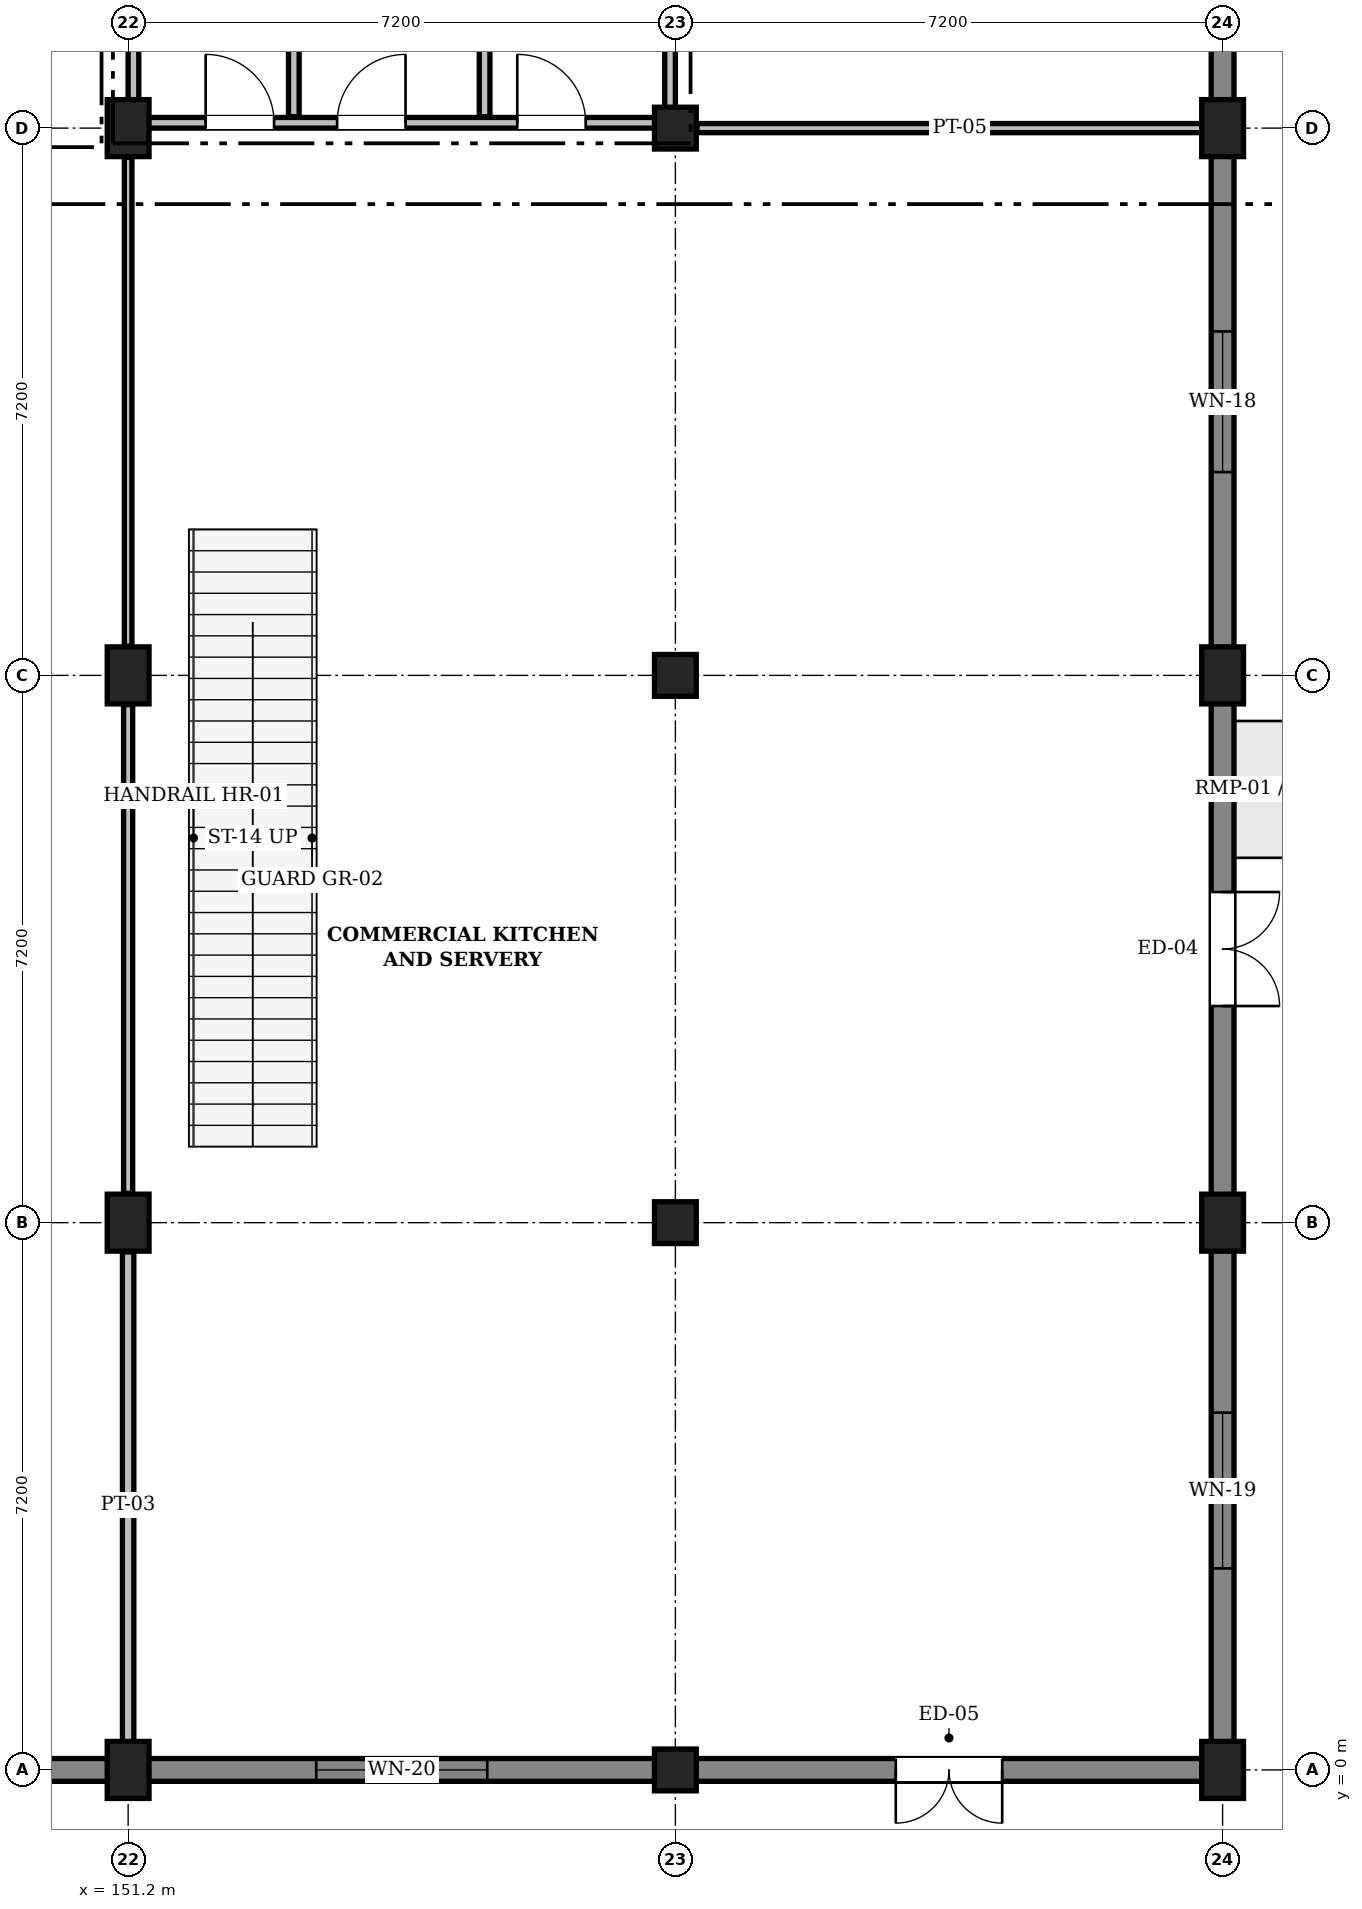
"""IFC4 building model, lengths in metres.
Left out: names, types, materials, properties, quantities, classifications, styles, units other than length and angle.
Written with IfcOpenShell. Run it as: python <this file> out.ifc"""

import sys

from ifc_helpers import new_model, si_unit, direction, frame, frame_2d, origin, origin_2d, place, context, subcontext, project, spatial, rectangle, extrude, element, fill, save


model = new_model("IFC4")
c1 = context("Model", 3, precision=1e-05, world=origin(), true_north=direction((0.0, 1.0)))
c2 = subcontext(c1, "Body", "Model", "MODEL_VIEW")
j1 = project(units=[si_unit("LENGTHUNIT", "METRE"), si_unit("PLANEANGLEUNIT", "RADIAN")], contexts=[c1])
p1 = place(None, origin())
s1 = spatial("IfcSite", under=j1, at=p1, CompositionType="ELEMENT")
p2 = place(p1, origin())
s2 = spatial("IfcBuilding", under=s1, at=p2, CompositionType="ELEMENT")
p3 = place(p2, origin())
s3 = spatial("IfcBuildingStorey", under=s2, at=p3, CompositionType="ELEMENT", Elevation=0.0)
for number, where, z_axis, x_axis in (
    (1, (151.2, 0.0, 0.0), (0.0, 0.0, 1.0), (1.0, 0.0, 0.0)),
    (2, (151.2, 7.2, 0.0), (0.0, 0.0, 1.0), (1.0, 0.0, 0.0)),
    (3, (151.2, 14.4, 0.0), (0.0, 0.0, 1.0), (1.0, 0.0, 0.0)),
    (4, (151.2, 21.6, 0.0), (0.0, 0.0, 1.0), (1.0, 0.0, 0.0)),
):
    element("IfcColumn", number, at=place(p3, frame(where, z_axis=z_axis, x_axis=x_axis)), inside=s3, PredefinedType="COLUMN", context=c2, shape_type="SweptSolid", body=[
        extrude(rectangle(XDim=0.55, YDim=0.75, at=origin_2d()), origin(), (0.0, 0.0, 1.0), 4.8),
    ])
for number, where, z_axis, x_axis in (
    (5, (158.4, 0.0, 0.0), (0.0, 0.0, 1.0), (1.0, 0.0, 0.0)),
    (6, (158.4, 7.2, 0.0), (0.0, 0.0, 1.0), (1.0, 0.0, 0.0)),
    (7, (158.4, 14.4, 0.0), (0.0, 0.0, 1.0), (1.0, 0.0, 0.0)),
    (8, (158.4, 21.6, 0.0), (0.0, 0.0, 1.0), (1.0, 0.0, 0.0)),
):
    element("IfcColumn", number, at=place(p3, frame(where, z_axis=z_axis, x_axis=x_axis)), inside=s3, PredefinedType="COLUMN", context=c2, shape_type="SweptSolid", body=[
        extrude(rectangle(XDim=0.55, YDim=0.55, at=origin_2d()), origin(), (0.0, 0.0, 1.0), 4.8),
    ])
for number, where, z_axis, x_axis in (
    (9, (165.6, 0.0, 0.0), (0.0, 0.0, 1.0), (1.0, 0.0, 0.0)),
    (10, (165.6, 7.2, 0.0), (0.0, 0.0, 1.0), (1.0, 0.0, 0.0)),
    (11, (165.6, 14.4, 0.0), (0.0, 0.0, 1.0), (1.0, 0.0, 0.0)),
    (12, (165.6, 21.6, 0.0), (0.0, 0.0, 1.0), (1.0, 0.0, 0.0)),
):
    element("IfcColumn", number, at=place(p3, frame(where, z_axis=z_axis, x_axis=x_axis)), inside=s3, PredefinedType="COLUMN", context=c2, shape_type="SweptSolid", body=[
        extrude(rectangle(XDim=0.55, YDim=0.75, at=origin_2d()), origin(), (0.0, 0.0, 1.0), 4.8),
    ])
p4 = place(p3, frame((165.6, 28.8, 0.0), z_axis=(0.0, 0.0, 1.0), x_axis=(0.0, -1.0, 0.0)))
e13 = element("IfcWall", 13, at=p4, inside=s3, PredefinedType="SOLIDWALL", context=c2, shape_type="SweptSolid", body=[
    extrude(rectangle(XDim=7.2, YDim=0.3, at=frame_2d((3.6, 0.0))), origin(), (0.0, 0.0, 1.0), 4.52),
])
p5 = place(p4, frame((2.8, 0.0, 0.0)))
e14 = element("IfcOpeningElement", 14, at=p5, cuts=e13, PredefinedType="OPENING", context=c2, shape_type="SweptSolid", body=[
    extrude(rectangle(XDim=1.6, YDim=2.2, at=frame_2d((0.8, 1.1))), frame((0.0, 0.162, 0.0), z_axis=(0.0, -1.0, 0.0), x_axis=(1.0, 0.0, 0.0)), (0.0, 0.0, 1.0), 0.324),
])
p6 = place(p3, frame((165.6, 21.6, 0.0), z_axis=(0.0, 0.0, 1.0), x_axis=(0.0, -1.0, 0.0)))
e15 = element("IfcWall", 15, at=p6, inside=s3, PredefinedType="SOLIDWALL", context=c2, shape_type="SweptSolid", body=[
    extrude(rectangle(XDim=7.2, YDim=0.3, at=frame_2d((3.6, 0.0))), origin(), (0.0, 0.0, 1.0), 4.52),
])
p7 = place(p6, frame((2.675, 0.0, 0.95)))
e16 = element("IfcOpeningElement", 16, at=p7, cuts=e15, PredefinedType="OPENING", context=c2, shape_type="SweptSolid", body=[
    extrude(rectangle(XDim=1.85, YDim=1.55, at=frame_2d((0.925, 0.775))), frame((0.0, 0.162, 0.0), z_axis=(0.0, -1.0, 0.0), x_axis=(1.0, 0.0, 0.0)), (0.0, 0.0, 1.0), 0.324),
])
p8 = place(p3, frame((165.6, 14.4, 0.0), z_axis=(0.0, 0.0, 1.0), x_axis=(0.0, -1.0, 0.0)))
e17 = element("IfcWall", 17, at=p8, inside=s3, PredefinedType="SOLIDWALL", context=c2, shape_type="SweptSolid", body=[
    extrude(rectangle(XDim=7.2, YDim=0.3, at=frame_2d((3.6, 0.0))), origin(), (0.0, 0.0, 1.0), 4.52),
])
p9 = place(p8, frame((2.85, 0.0, 0.0)))
e18 = element("IfcOpeningElement", 18, at=p9, cuts=e17, PredefinedType="OPENING", context=c2, shape_type="SweptSolid", body=[
    extrude(rectangle(XDim=1.5, YDim=2.15, at=frame_2d((0.75, 1.075))), frame((0.0, 0.162, 0.0), z_axis=(0.0, -1.0, 0.0), x_axis=(1.0, 0.0, 0.0)), (0.0, 0.0, 1.0), 0.324),
])
p10 = place(p3, frame((165.6, 7.2, 0.0), z_axis=(0.0, 0.0, 1.0), x_axis=(0.0, -1.0, 0.0)))
e19 = element("IfcWall", 19, at=p10, inside=s3, PredefinedType="SOLIDWALL", context=c2, shape_type="SweptSolid", body=[
    extrude(rectangle(XDim=7.048, YDim=0.3, at=frame_2d((3.524, 0.0))), origin(), (0.0, 0.0, 1.0), 4.52),
])
p11 = place(p10, frame((2.499, 0.0, 0.95)))
e20 = element("IfcOpeningElement", 20, at=p11, cuts=e19, PredefinedType="OPENING", context=c2, shape_type="SweptSolid", body=[
    extrude(rectangle(XDim=2.05, YDim=1.55, at=frame_2d((1.025, 0.775))), frame((0.0, 0.162, 0.0), z_axis=(0.0, -1.0, 0.0), x_axis=(1.0, 0.0, 0.0)), (0.0, 0.0, 1.0), 0.324),
])
p12 = place(p3, frame((165.75, 0.0, 0.0), z_axis=(0.0, 0.0, 1.0), x_axis=(-1.0, 0.0, 0.0)))
e21 = element("IfcWall", 21, at=p12, inside=s3, PredefinedType="SOLIDWALL", context=c2, shape_type="SweptSolid", body=[
    extrude(rectangle(XDim=7.35, YDim=0.3, at=frame_2d((3.675, 0.0))), origin(), (0.0, 0.0, 1.0), 4.52),
])
p13 = place(p12, frame((3.05, 0.0, 0.0)))
e22 = element("IfcOpeningElement", 22, at=p13, cuts=e21, PredefinedType="OPENING", context=c2, shape_type="SweptSolid", body=[
    extrude(rectangle(XDim=1.4, YDim=2.15, at=frame_2d((0.7, 1.075))), frame((0.0, 0.162, 0.0), z_axis=(0.0, -1.0, 0.0), x_axis=(1.0, 0.0, 0.0)), (0.0, 0.0, 1.0), 0.324),
])
p14 = place(p3, frame((158.4, 0.0, 0.0), z_axis=(0.0, 0.0, 1.0), x_axis=(-1.0, 0.0, 0.0)))
e23 = element("IfcWall", 23, at=p14, inside=s3, PredefinedType="SOLIDWALL", context=c2, shape_type="SweptSolid", body=[
    extrude(rectangle(XDim=7.2, YDim=0.3, at=frame_2d((3.6, 0.0))), origin(), (0.0, 0.0, 1.0), 4.52),
])
p15 = place(p14, frame((2.475, 0.0, 0.95)))
e24 = element("IfcOpeningElement", 24, at=p15, cuts=e23, PredefinedType="OPENING", context=c2, shape_type="SweptSolid", body=[
    extrude(rectangle(XDim=2.25, YDim=1.55, at=frame_2d((1.125, 0.775))), frame((0.0, 0.162, 0.0), z_axis=(0.0, -1.0, 0.0), x_axis=(1.0, 0.0, 0.0)), (0.0, 0.0, 1.0), 0.324),
])
p16 = place(p3, frame((151.2, 0.0, 0.0), z_axis=(0.0, 0.0, 1.0), x_axis=(-1.0, 0.0, 0.0)))
e25 = element("IfcWall", 25, at=p16, inside=s3, PredefinedType="SOLIDWALL", context=c2, shape_type="SweptSolid", body=[
    extrude(rectangle(XDim=7.2, YDim=0.3, at=frame_2d((3.6, 0.0))), origin(), (0.0, 0.0, 1.0), 4.52),
])
p17 = place(p16, frame((3.04, 0.0, 0.0)))
e26 = element("IfcOpeningElement", 26, at=p17, cuts=e25, PredefinedType="OPENING", context=c2, shape_type="SweptSolid", body=[
    extrude(rectangle(XDim=1.12, YDim=2.15, at=frame_2d((0.56, 1.075))), frame((0.0, 0.162, 0.0), z_axis=(0.0, -1.0, 0.0), x_axis=(1.0, 0.0, 0.0)), (0.0, 0.0, 1.0), 0.324),
])
p18 = place(p3, frame((151.27, 21.67, 0.0), z_axis=(0.0, 0.0, 1.0), x_axis=(1.0, 0.0, 0.0)))
e27 = element("IfcWall", 27, at=p18, inside=s3, PredefinedType="PARTITIONING", context=c2, shape_type="SweptSolid", body=[
    extrude(rectangle(XDim=7.06, YDim=0.14, at=frame_2d((3.53, 0.0))), origin(), (0.0, 0.0, 1.0), 3.83),
])
p19 = place(p18, frame((0.95, 0.0, 0.0)))
e28 = element("IfcOpeningElement", 28, at=p19, cuts=e27, PredefinedType="OPENING", context=c2, shape_type="SweptSolid", body=[
    extrude(rectangle(XDim=0.9, YDim=2.08, at=frame_2d((0.45, 1.04))), frame((0.0, 0.082, 0.0), z_axis=(0.0, -1.0, 0.0), x_axis=(1.0, 0.0, 0.0)), (0.0, 0.0, 1.0), 0.164),
])
p20 = place(p18, frame((2.68, 0.0, 0.0)))
e29 = element("IfcOpeningElement", 29, at=p20, cuts=e27, PredefinedType="OPENING", context=c2, shape_type="SweptSolid", body=[
    extrude(rectangle(XDim=0.9, YDim=2.08, at=frame_2d((0.45, 1.04))), frame((0.0, 0.082, 0.0), z_axis=(0.0, -1.0, 0.0), x_axis=(1.0, 0.0, 0.0)), (0.0, 0.0, 1.0), 0.164),
])
p21 = place(p18, frame((5.05, 0.0, 0.0)))
e30 = element("IfcOpeningElement", 30, at=p21, cuts=e27, PredefinedType="OPENING", context=c2, shape_type="SweptSolid", body=[
    extrude(rectangle(XDim=0.9, YDim=2.08, at=frame_2d((0.45, 1.04))), frame((0.0, 0.082, 0.0), z_axis=(0.0, -1.0, 0.0), x_axis=(1.0, 0.0, 0.0)), (0.0, 0.0, 1.0), 0.164),
])
for number, where, z_axis, x_axis in (
    (31, (151.27, 21.75, 0.0), (0.0, 0.0, 1.0), (0.0, 1.0, 0.0)),
    (32, (158.33, 21.75, 0.0), (0.0, 0.0, 1.0), (0.0, 1.0, 0.0)),
):
    element("IfcWall", number, at=place(p3, frame(where, z_axis=z_axis, x_axis=x_axis)), inside=s3, PredefinedType="PARTITIONING", context=c2, shape_type="SweptSolid", body=[
        extrude(rectangle(XDim=6.9, YDim=0.14, at=frame_2d((3.45, 0.0))), origin(), (0.0, 0.0, 1.0), 4.08),
    ])
for number, where, z_axis, x_axis in (
    (33, (153.38, 21.75, 0.0), (0.0, 0.0, 1.0), (0.0, 1.0, 0.0)),
    (34, (155.89, 21.75, 0.0), (0.0, 0.0, 1.0), (0.0, 1.0, 0.0)),
):
    element("IfcWall", number, at=place(p3, frame(where, z_axis=z_axis, x_axis=x_axis)), inside=s3, PredefinedType="PARTITIONING", context=c2, shape_type="SweptSolid", body=[
        extrude(rectangle(XDim=6.9, YDim=0.14, at=frame_2d((3.45, 0.0))), origin(), (0.0, 0.0, 1.0), 4.46),
    ])
p22 = place(p3, frame((151.2, 0.162, 0.0), z_axis=(0.0, 0.0, 1.0), x_axis=(0.0, 1.0, 0.0)))
e35 = element("IfcWall", 35, at=p22, inside=s3, PredefinedType="PARTITIONING", context=c2, shape_type="SweptSolid", body=[
    extrude(rectangle(XDim=6.653, YDim=0.15, at=frame_2d((3.326, 0.0))), origin(), (0.0, 0.0, 1.0), 4.08),
])
p23 = place(p3, frame((151.2, 7.585, 0.0), z_axis=(0.0, 0.0, 1.0), x_axis=(0.0, 1.0, 0.0)))
e36 = element("IfcWall", 36, at=p23, inside=s3, PredefinedType="PARTITIONING", context=c2, shape_type="SweptSolid", body=[
    extrude(rectangle(XDim=6.43, YDim=0.12, at=frame_2d((3.215, 0.0))), origin(), (0.0, 0.0, 1.0), 4.08),
])
p24 = place(p3, frame((151.2, 14.785, 0.0), z_axis=(0.0, 0.0, 1.0), x_axis=(0.0, 1.0, 0.0)))
e37 = element("IfcWall", 37, at=p24, inside=s3, PredefinedType="PARTITIONING", context=c2, shape_type="SweptSolid", body=[
    extrude(rectangle(XDim=6.43, YDim=0.1, at=frame_2d((3.215, 0.0))), origin(), (0.0, 0.0, 1.0), 4.08),
])
p25 = place(p3, frame((158.685, 21.6, 0.0), z_axis=(0.0, 0.0, 1.0), x_axis=(1.0, 0.0, 0.0)))
e38 = element("IfcWall", 38, at=p25, inside=s3, PredefinedType="PARTITIONING", context=c2, shape_type="SweptSolid", body=[
    extrude(rectangle(XDim=6.753, YDim=0.12, at=frame_2d((3.376, 0.0))), origin(), (0.0, 0.0, 1.0), 3.83),
])
p26 = place(p7, origin())
e39 = element("IfcWindow", 39, at=p26, inside=s3, PartitioningType="SINGLE_PANEL", PredefinedType="WINDOW", context=c2, shape_type="SweptSolid", body=[
    extrude(rectangle(XDim=1.85, YDim=1.55, at=frame_2d((0.925, 0.775))), frame((0.0, 0.03, 0.0), z_axis=(0.0, -1.0, 0.0), x_axis=(1.0, 0.0, 0.0)), (0.0, 0.0, 1.0), 0.06),
])
fill(e16, e39)
p27 = place(p9, origin())
e40 = element("IfcDoor", 40, at=p27, inside=s3, OperationType="DOUBLE_DOOR_SINGLE_SWING", PredefinedType="DOOR", context=c2, shape_type="SweptSolid", body=[
    extrude(rectangle(XDim=1.5, YDim=2.15, at=frame_2d((0.75, 1.075))), frame((0.0, 0.025, 0.0), z_axis=(0.0, -1.0, 0.0), x_axis=(1.0, 0.0, 0.0)), (0.0, 0.0, 1.0), 0.05),
])
fill(e18, e40)
p28 = place(p11, origin())
e41 = element("IfcWindow", 41, at=p28, inside=s3, PartitioningType="SINGLE_PANEL", PredefinedType="WINDOW", context=c2, shape_type="SweptSolid", body=[
    extrude(rectangle(XDim=2.05, YDim=1.55, at=frame_2d((1.025, 0.775))), frame((0.0, 0.03, 0.0), z_axis=(0.0, -1.0, 0.0), x_axis=(1.0, 0.0, 0.0)), (0.0, 0.0, 1.0), 0.06),
])
fill(e20, e41)
p29 = place(p13, origin())
e42 = element("IfcDoor", 42, at=p29, inside=s3, OperationType="DOUBLE_DOOR_SINGLE_SWING", PredefinedType="DOOR", context=c2, shape_type="SweptSolid", body=[
    extrude(rectangle(XDim=1.4, YDim=2.15, at=frame_2d((0.7, 1.075))), frame((0.0, 0.025, 0.0), z_axis=(0.0, -1.0, 0.0), x_axis=(1.0, 0.0, 0.0)), (0.0, 0.0, 1.0), 0.05),
])
fill(e22, e42)
p30 = place(p15, origin())
e43 = element("IfcWindow", 43, at=p30, inside=s3, PartitioningType="SINGLE_PANEL", PredefinedType="WINDOW", context=c2, shape_type="SweptSolid", body=[
    extrude(rectangle(XDim=2.25, YDim=1.55, at=frame_2d((1.125, 0.775))), frame((0.0, 0.03, 0.0), z_axis=(0.0, -1.0, 0.0), x_axis=(1.0, 0.0, 0.0)), (0.0, 0.0, 1.0), 0.06),
])
fill(e24, e43)
p31 = place(p19, origin())
e44 = element("IfcDoor", 44, at=p31, inside=s3, OperationType="SINGLE_SWING_LEFT", PredefinedType="DOOR", context=c2, shape_type="SweptSolid", body=[
    extrude(rectangle(XDim=0.9, YDim=2.08, at=frame_2d((0.45, 1.04))), frame((0.0, 0.025, 0.0), z_axis=(0.0, -1.0, 0.0), x_axis=(1.0, 0.0, 0.0)), (0.0, 0.0, 1.0), 0.05),
])
fill(e28, e44)
p32 = place(p20, origin())
e45 = element("IfcDoor", 45, at=p32, inside=s3, OperationType="SINGLE_SWING_RIGHT", PredefinedType="DOOR", context=c2, shape_type="SweptSolid", body=[
    extrude(rectangle(XDim=0.9, YDim=2.08, at=frame_2d((0.45, 1.04))), frame((0.0, 0.025, 0.0), z_axis=(0.0, -1.0, 0.0), x_axis=(1.0, 0.0, 0.0)), (0.0, 0.0, 1.0), 0.05),
])
fill(e29, e45)
p33 = place(p21, origin())
e46 = element("IfcDoor", 46, at=p33, inside=s3, OperationType="SINGLE_SWING_LEFT", PredefinedType="DOOR", context=c2, shape_type="SweptSolid", body=[
    extrude(rectangle(XDim=0.9, YDim=2.08, at=frame_2d((0.45, 1.04))), frame((0.0, 0.025, 0.0), z_axis=(0.0, -1.0, 0.0), x_axis=(1.0, 0.0, 0.0)), (0.0, 0.0, 1.0), 0.05),
])
fill(e30, e46)
save(model, sys.argv[1])
